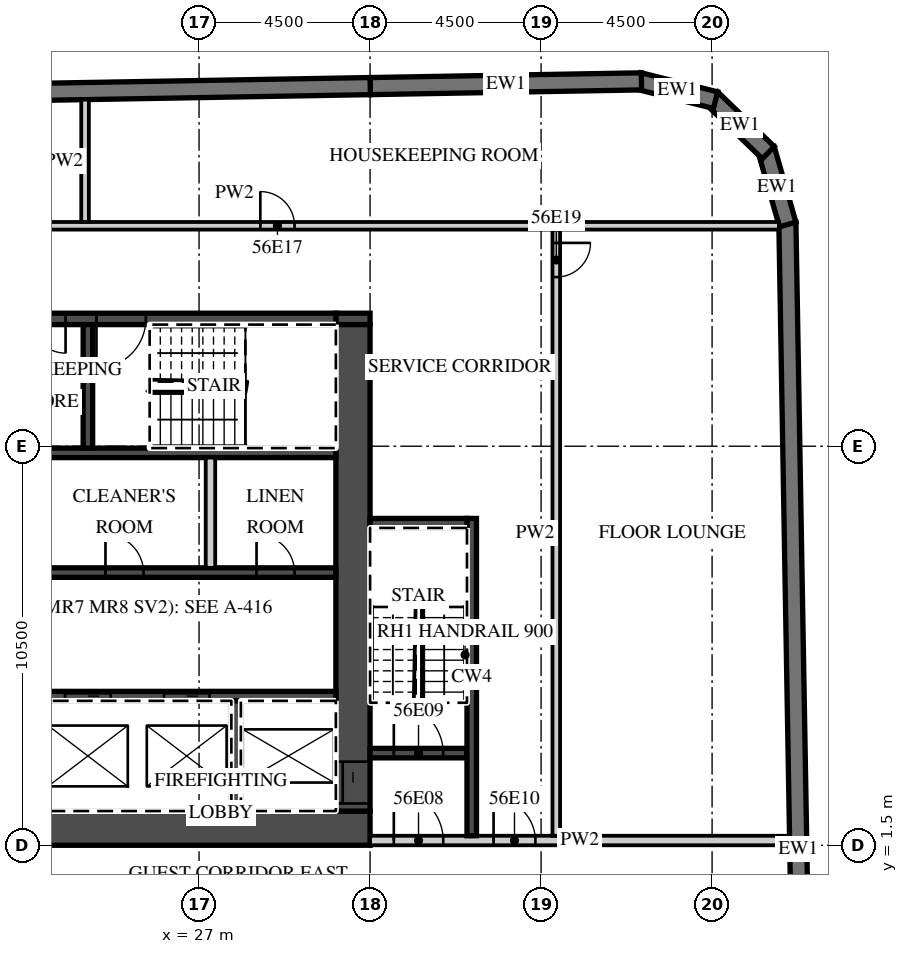
"""IFC4 building model, lengths in metres.
Left out: names, types, materials, properties, quantities, classifications, styles, units other than length and angle.
Written with IfcOpenShell. Run it as: python <this file> out.ifc"""

import sys

from ifc_helpers import new_model, si_unit, direction, frame, frame_2d, origin, place, context, subcontext, project, spatial, polyline, rectangle, outline, extrude, element, fill, save


model = new_model("IFC4")
c1 = context("Model", 3, precision=1e-05, world=origin(), true_north=direction((0.0, 1.0)))
c2 = subcontext(c1, "Body", "Model", "MODEL_VIEW")
j1 = project(units=[si_unit("LENGTHUNIT", "METRE"), si_unit("PLANEANGLEUNIT", "RADIAN")], contexts=[c1])
p1 = place(None, origin())
s1 = spatial("IfcSite", under=j1, at=p1, CompositionType="ELEMENT")
p2 = place(p1, origin())
s2 = spatial("IfcBuilding", under=s1, at=p2, CompositionType="ELEMENT")
p3 = place(p2, frame((0.0, 0.0, 230.9)))
s3 = spatial("IfcBuildingStorey", under=s2, at=p3, CompositionType="ELEMENT", Elevation=230.9)
p4 = place(p3, frame((43.057, -15.103, 0.0), z_axis=(0.0, 0.0, 1.0), x_axis=(-0.017452408953, 0.999847695112, 0.0)))
e1 = element("IfcWall", 1, at=p4, inside=s3, PredefinedType="SOLIDWALL", context=c2, shape_type="SweptSolid", body=[
    extrude(rectangle(XDim=33.0, YDim=0.45, at=frame_2d((16.5, 0.0))), origin(), (0.0, 0.0, 1.0), 3.02),
])
p5 = place(p3, frame((42.49, 17.833, 0.0), z_axis=(0.0, 0.0, 1.0), x_axis=(-0.275546368831, 0.961287781377, 0.0)))
e2 = element("IfcWall", 2, at=p5, inside=s3, PredefinedType="SOLIDWALL", context=c2, shape_type="SweptSolid", body=[
    extrude(outline(polyline([(0.0, -0.225), (2.071, -0.225), (1.95, 0.225), (0.121, 0.225), (0.0, -0.225)])), origin(), (0.0, 0.0, 1.0), 3.02),
])
p6 = place(p3, frame((41.979, 19.724, 0.0), z_axis=(0.0, 0.0, 1.0), x_axis=(-0.719379111448, 0.694617660308, 0.0)))
e3 = element("IfcWall", 3, at=p6, inside=s3, PredefinedType="SOLIDWALL", context=c2, shape_type="SweptSolid", body=[
    extrude(outline(polyline([(0.0, -0.225), (2.071, -0.225), (1.95, 0.225), (0.121, 0.225), (0.0, -0.225)])), origin(), (0.0, 0.0, 1.0), 3.02),
])
p7 = place(p3, frame((40.591, 21.106, 0.0), z_axis=(0.0, 0.0, 1.0), x_axis=(-0.970287979719, 0.241952963225, 0.0)))
e4 = element("IfcWall", 4, at=p7, inside=s3, PredefinedType="SOLIDWALL", context=c2, shape_type="SweptSolid", body=[
    extrude(outline(polyline([(0.0, -0.225), (2.071, -0.225), (1.95, 0.225), (0.121, 0.225), (0.0, -0.225)])), origin(), (0.0, 0.0, 1.0), 3.02),
])
p8 = place(p3, frame((38.641, 21.6, 0.0), z_axis=(0.0, 0.0, 1.0), x_axis=(-0.999847245074, -0.017478172627, 0.0)))
e5 = element("IfcWall", 5, at=p8, inside=s3, PredefinedType="SOLIDWALL", context=c2, shape_type="SweptSolid", body=[
    extrude(rectangle(XDim=7.138, YDim=0.45, at=frame_2d((3.569, 0.0))), origin(), (0.0, 0.0, 1.0), 3.02),
])
p9 = place(p3, frame((31.504, 21.476, 0.0), z_axis=(0.0, 0.0, 1.0), x_axis=(-0.999847677887, -0.017453395744, 0.0)))
e6 = element("IfcWall", 6, at=p9, inside=s3, PredefinedType="SOLIDWALL", context=c2, shape_type="SweptSolid", body=[
    extrude(rectangle(XDim=18.003, YDim=0.45, at=frame_2d((9.001, 0.0))), origin(), (0.0, 0.0, 1.0), 3.02),
])
p10 = place(p3, frame((13.5, 1.95, 0.0), z_axis=(0.0, 0.0, 1.0), x_axis=(1.0, 0.0, 0.0)))
e7 = element("IfcWall", 7, at=p10, inside=s3, PredefinedType="SHEAR", context=c2, shape_type="SweptSolid", body=[
    extrude(rectangle(XDim=18.0, YDim=0.9, at=frame_2d((9.0, 0.0))), origin(), (0.0, 0.0, 1.0), 3.02),
])
p11 = place(p10, frame((1.475, 0.0, 0.0)))
e8 = element("IfcOpeningElement", 8, at=p11, cuts=e7, PredefinedType="OPENING", context=c2, shape_type="SweptSolid", body=[
    extrude(rectangle(XDim=1.8, YDim=2.1, at=frame_2d((0.9, 1.05))), frame((0.0, 0.46, 0.0), z_axis=(0.0, -1.0, 0.0), x_axis=(1.0, 0.0, 0.0)), (0.0, 0.0, 1.0), 0.92),
])
p12 = place(p3, frame((30.6, 15.35, 0.0), z_axis=(0.0, 0.0, 1.0), x_axis=(1.0, 0.0, 0.0)))
e9 = element("IfcWall", 9, at=p12, inside=s3, PredefinedType="SHEAR", context=c2, shape_type="SweptSolid", body=[
    extrude(rectangle(XDim=0.9, YDim=0.3, at=frame_2d((0.45, 0.0))), origin(), (0.0, 0.0, 1.0), 3.02),
])
p13 = place(p3, frame((20.3, 15.35, 0.0), z_axis=(0.0, 0.0, 1.0), x_axis=(1.0, 0.0, 0.0)))
e10 = element("IfcWall", 10, at=p13, inside=s3, PredefinedType="SHEAR", context=c2, shape_type="SweptSolid", body=[
    extrude(rectangle(XDim=10.3, YDim=0.3, at=frame_2d((5.15, 0.0))), origin(), (0.0, 0.0, 1.0), 3.02),
])
p14 = place(p13, frame((4.0, 0.0, 0.0)))
e11 = element("IfcOpeningElement", 11, at=p14, cuts=e10, PredefinedType="OPENING", context=c2, shape_type="SweptSolid", body=[
    extrude(rectangle(XDim=1.3, YDim=2.1, at=frame_2d((0.65, 1.05))), frame((0.0, 0.16, 0.0), z_axis=(0.0, -1.0, 0.0), x_axis=(1.0, 0.0, 0.0)), (0.0, 0.0, 1.0), 0.32),
])
p15 = place(p13, frame((2.288, 0.0, 0.0)))
e12 = element("IfcOpeningElement", 12, at=p15, cuts=e10, PredefinedType="OPENING", context=c2, shape_type="SweptSolid", body=[
    extrude(rectangle(XDim=0.9, YDim=2.1, at=frame_2d((0.45, 1.05))), frame((0.0, 0.16, 0.0), z_axis=(0.0, -1.0, 0.0), x_axis=(1.0, 0.0, 0.0)), (0.0, 0.0, 1.0), 0.32),
])
p16 = place(p13, frame((0.462, 0.0, 0.0)))
e13 = element("IfcOpeningElement", 13, at=p16, cuts=e10, PredefinedType="OPENING", context=c2, shape_type="SweptSolid", body=[
    extrude(rectangle(XDim=0.9, YDim=2.1, at=frame_2d((0.45, 1.05))), frame((0.0, 0.16, 0.0), z_axis=(0.0, -1.0, 0.0), x_axis=(1.0, 0.0, 0.0)), (0.0, 0.0, 1.0), 0.32),
])
p17 = place(p3, frame((31.05, 2.4, 0.0), z_axis=(0.0, 0.0, 1.0), x_axis=(0.0, 1.0, 0.0)))
e14 = element("IfcWall", 14, at=p17, inside=s3, PredefinedType="SHEAR", context=c2, shape_type="SweptSolid", body=[
    extrude(rectangle(XDim=12.8, YDim=0.9, at=frame_2d((6.4, 0.0))), origin(), (0.0, 0.0, 1.0), 3.02),
])
p18 = place(p17, frame((0.2, 0.0, 0.0)))
e15 = element("IfcOpeningElement", 15, at=p18, cuts=e14, PredefinedType="OPENING", context=c2, shape_type="SweptSolid", body=[
    extrude(rectangle(XDim=1.1, YDim=2.1, at=frame_2d((0.55, 1.05))), frame((0.0, 0.46, 0.0), z_axis=(0.0, -1.0, 0.0), x_axis=(1.0, 0.0, 0.0)), (0.0, 0.0, 1.0), 0.92),
])
p19 = place(p3, frame((17.6, 5.425, 0.0), z_axis=(0.0, 0.0, 1.0), x_axis=(1.0, 0.0, 0.0)))
e16 = element("IfcWall", 16, at=p19, inside=s3, PredefinedType="SHEAR", context=c2, shape_type="SweptSolid", body=[
    extrude(rectangle(XDim=13.0, YDim=0.25, at=frame_2d((6.5, 0.0))), origin(), (0.0, 0.0, 1.0), 3.02),
])
p20 = place(p19, frame((8.475, 0.0, 0.0)))
e17 = element("IfcOpeningElement", 17, at=p20, cuts=e16, PredefinedType="OPENING", context=c2, shape_type="SweptSolid", body=[
    extrude(rectangle(XDim=1.2, YDim=2.1, at=frame_2d((0.6, 1.05))), frame((0.0, 0.135, 0.0), z_axis=(0.0, -1.0, 0.0), x_axis=(1.0, 0.0, 0.0)), (0.0, 0.0, 1.0), 0.27),
])
p21 = place(p19, frame((5.875, 0.0, 0.0)))
e18 = element("IfcOpeningElement", 18, at=p21, cuts=e16, PredefinedType="OPENING", context=c2, shape_type="SweptSolid", body=[
    extrude(rectangle(XDim=1.2, YDim=2.1, at=frame_2d((0.6, 1.05))), frame((0.0, 0.135, 0.0), z_axis=(0.0, -1.0, 0.0), x_axis=(1.0, 0.0, 0.0)), (0.0, 0.0, 1.0), 0.27),
])
p22 = place(p3, frame((27.975, 2.4, 0.0), z_axis=(0.0, 0.0, 1.0), x_axis=(0.0, 1.0, 0.0)))
e19 = element("IfcWall", 19, at=p22, inside=s3, PredefinedType="SHEAR", context=c2, shape_type="SweptSolid", body=[
    extrude(rectangle(XDim=2.9, YDim=0.25, at=frame_2d((1.45, 0.0))), origin(), (0.0, 0.0, 1.0), 3.02),
])
p23 = place(p3, frame((14.4, 8.675, 0.0), z_axis=(0.0, 0.0, 1.0), x_axis=(1.0, 0.0, 0.0)))
e20 = element("IfcWall", 20, at=p23, inside=s3, PredefinedType="SHEAR", context=c2, shape_type="SweptSolid", body=[
    extrude(rectangle(XDim=16.2, YDim=0.25, at=frame_2d((8.1, 0.0))), origin(), (0.0, 0.0, 1.0), 3.02),
])
p24 = place(p23, frame((6.45, 0.0, 0.0)))
e21 = element("IfcOpeningElement", 21, at=p24, cuts=e20, PredefinedType="OPENING", context=c2, shape_type="SweptSolid", body=[
    extrude(rectangle(XDim=1.2, YDim=2.1, at=frame_2d((0.6, 1.05))), frame((0.0, 0.135, 0.0), z_axis=(0.0, -1.0, 0.0), x_axis=(1.0, 0.0, 0.0)), (0.0, 0.0, 1.0), 0.27),
])
p25 = place(p23, frame((3.8, 0.0, 0.0)))
e22 = element("IfcOpeningElement", 22, at=p25, cuts=e20, PredefinedType="OPENING", context=c2, shape_type="SweptSolid", body=[
    extrude(rectangle(XDim=1.2, YDim=2.1, at=frame_2d((0.6, 1.05))), frame((0.0, 0.135, 0.0), z_axis=(0.0, -1.0, 0.0), x_axis=(1.0, 0.0, 0.0)), (0.0, 0.0, 1.0), 0.27),
])
p26 = place(p23, frame((0.65, 0.0, 0.0)))
e23 = element("IfcOpeningElement", 23, at=p26, cuts=e20, PredefinedType="OPENING", context=c2, shape_type="SweptSolid", body=[
    extrude(rectangle(XDim=1.3, YDim=2.1, at=frame_2d((0.65, 1.05))), frame((0.0, 0.135, 0.0), z_axis=(0.0, -1.0, 0.0), x_axis=(1.0, 0.0, 0.0)), (0.0, 0.0, 1.0), 0.27),
])
p27 = place(p23, frame((14.113, 0.0, 0.0)))
e24 = element("IfcOpeningElement", 24, at=p27, cuts=e20, PredefinedType="OPENING", context=c2, shape_type="SweptSolid", body=[
    extrude(rectangle(XDim=1.0, YDim=2.1, at=frame_2d((0.5, 1.05))), frame((0.0, 0.135, 0.0), z_axis=(0.0, -1.0, 0.0), x_axis=(1.0, 0.0, 0.0)), (0.0, 0.0, 1.0), 0.27),
])
p28 = place(p23, frame((10.137, 0.0, 0.0)))
e25 = element("IfcOpeningElement", 25, at=p28, cuts=e20, PredefinedType="OPENING", context=c2, shape_type="SweptSolid", body=[
    extrude(rectangle(XDim=1.0, YDim=2.1, at=frame_2d((0.5, 1.05))), frame((0.0, 0.135, 0.0), z_axis=(0.0, -1.0, 0.0), x_axis=(1.0, 0.0, 0.0)), (0.0, 0.0, 1.0), 0.27),
])
p29 = place(p3, frame((17.35, 11.825, 0.0), z_axis=(0.0, 0.0, 1.0), x_axis=(1.0, 0.0, 0.0)))
e26 = element("IfcWall", 26, at=p29, inside=s3, PredefinedType="SHEAR", context=c2, shape_type="SweptSolid", body=[
    extrude(rectangle(XDim=13.25, YDim=0.25, at=frame_2d((6.625, 0.0))), origin(), (0.0, 0.0, 1.0), 3.02),
])
p30 = place(p3, frame((27.3, 8.8, 0.0), z_axis=(0.0, 0.0, 1.0), x_axis=(0.0, 1.0, 0.0)))
e27 = element("IfcWall", 27, at=p30, inside=s3, PredefinedType="PARTITIONING", context=c2, shape_type="SweptSolid", body=[
    extrude(rectangle(XDim=2.9, YDim=0.25, at=frame_2d((1.45, 0.0))), origin(), (0.0, 0.0, 1.0), 3.02),
])
p31 = place(p3, frame((24.075, 11.95, 0.0), z_axis=(0.0, 0.0, 1.0), x_axis=(0.0, 1.0, 0.0)))
e28 = element("IfcWall", 28, at=p31, inside=s3, PredefinedType="SHEAR", context=c2, shape_type="SweptSolid", body=[
    extrude(rectangle(XDim=3.25, YDim=0.25, at=frame_2d((1.625, 0.0))), origin(), (0.0, 0.0, 1.0), 3.02),
])
p32 = place(p3, frame((31.5, 1.625, 0.0), z_axis=(0.0, 0.0, 1.0), x_axis=(1.0, 0.0, 0.0)))
e29 = element("IfcWall", 29, at=p32, inside=s3, PredefinedType="PARTITIONING", context=c2, shape_type="SweptSolid", body=[
    extrude(rectangle(XDim=11.04, YDim=0.25, at=frame_2d((5.52, 0.0))), origin(), (0.0, 0.0, 1.0), 3.02),
])
p33 = place(p32, frame((0.625, 0.0, 0.0)))
e30 = element("IfcOpeningElement", 30, at=p33, cuts=e29, PredefinedType="OPENING", context=c2, shape_type="SweptSolid", body=[
    extrude(rectangle(XDim=1.3, YDim=2.1, at=frame_2d((0.65, 1.05))), frame((0.0, 0.135, 0.0), z_axis=(0.0, -1.0, 0.0), x_axis=(1.0, 0.0, 0.0)), (0.0, 0.0, 1.0), 0.27),
])
p34 = place(p32, frame((3.25, 0.0, 0.0)))
e31 = element("IfcOpeningElement", 31, at=p34, cuts=e29, PredefinedType="OPENING", context=c2, shape_type="SweptSolid", body=[
    extrude(rectangle(XDim=1.1, YDim=2.1, at=frame_2d((0.55, 1.05))), frame((0.0, 0.135, 0.0), z_axis=(0.0, -1.0, 0.0), x_axis=(1.0, 0.0, 0.0)), (0.0, 0.0, 1.0), 0.27),
])
p35 = place(p3, frame((31.5, 3.925, 0.0), z_axis=(0.0, 0.0, 1.0), x_axis=(1.0, 0.0, 0.0)))
e32 = element("IfcWall", 32, at=p35, inside=s3, PredefinedType="SHEAR", context=c2, shape_type="SweptSolid", body=[
    extrude(rectangle(XDim=2.55, YDim=0.25, at=frame_2d((1.275, 0.0))), origin(), (0.0, 0.0, 1.0), 3.02),
])
p36 = place(p35, frame((0.625, 0.0, 0.0)))
e33 = element("IfcOpeningElement", 33, at=p36, cuts=e32, PredefinedType="OPENING", context=c2, shape_type="SweptSolid", body=[
    extrude(rectangle(XDim=1.3, YDim=2.1, at=frame_2d((0.65, 1.05))), frame((0.0, 0.135, 0.0), z_axis=(0.0, -1.0, 0.0), x_axis=(1.0, 0.0, 0.0)), (0.0, 0.0, 1.0), 0.27),
])
p37 = place(p3, frame((34.175, 1.75, 0.0), z_axis=(0.0, 0.0, 1.0), x_axis=(0.0, 1.0, 0.0)))
e34 = element("IfcWall", 34, at=p37, inside=s3, PredefinedType="SHEAR", context=c2, shape_type="SweptSolid", body=[
    extrude(rectangle(XDim=8.35, YDim=0.25, at=frame_2d((4.175, 0.0))), origin(), (0.0, 0.0, 1.0), 3.02),
])
p38 = place(p3, frame((31.5, 9.975, 0.0), z_axis=(0.0, 0.0, 1.0), x_axis=(1.0, 0.0, 0.0)))
e35 = element("IfcWall", 35, at=p38, inside=s3, PredefinedType="SHEAR", context=c2, shape_type="SweptSolid", body=[
    extrude(rectangle(XDim=2.55, YDim=0.25, at=frame_2d((1.275, 0.0))), origin(), (0.0, 0.0, 1.0), 3.02),
])
p39 = place(p3, frame((36.4, 1.75, 0.0), z_axis=(0.0, 0.0, 1.0), x_axis=(0.0, 1.0, 0.0)))
e36 = element("IfcWall", 36, at=p39, inside=s3, PredefinedType="PARTITIONING", context=c2, shape_type="SweptSolid", body=[
    extrude(rectangle(XDim=15.95, YDim=0.2, at=frame_2d((7.975, 0.0))), origin(), (0.0, 0.0, 1.0), 3.02),
])
p40 = place(p39, frame((14.7, 0.0, 0.0)))
e37 = element("IfcOpeningElement", 37, at=p40, cuts=e36, PredefinedType="OPENING", context=c2, shape_type="SweptSolid", body=[
    extrude(rectangle(XDim=0.9, YDim=2.1, at=frame_2d((0.45, 1.05))), frame((0.0, 0.11, 0.0), z_axis=(0.0, -1.0, 0.0), x_axis=(1.0, 0.0, 0.0)), (0.0, 0.0, 1.0), 0.22),
])
p41 = place(p3, frame((13.6, 17.8, 0.0), z_axis=(0.0, 0.0, 1.0), x_axis=(1.0, 0.0, 0.0)))
e38 = element("IfcWall", 38, at=p41, inside=s3, PredefinedType="PARTITIONING", context=c2, shape_type="SweptSolid", body=[
    extrude(rectangle(XDim=28.657, YDim=0.2, at=frame_2d((14.329, 0.0))), origin(), (0.0, 0.0, 1.0), 3.02),
])
p42 = place(p41, frame((15.012, 0.0, 0.0)))
e39 = element("IfcOpeningElement", 39, at=p42, cuts=e38, PredefinedType="OPENING", context=c2, shape_type="SweptSolid", body=[
    extrude(rectangle(XDim=0.9, YDim=2.1, at=frame_2d((0.45, 1.05))), frame((0.0, 0.11, 0.0), z_axis=(0.0, -1.0, 0.0), x_axis=(1.0, 0.0, 0.0)), (0.0, 0.0, 1.0), 0.22),
])
p43 = place(p41, frame((6.712, 0.0, 0.0)))
e40 = element("IfcOpeningElement", 40, at=p43, cuts=e38, PredefinedType="OPENING", context=c2, shape_type="SweptSolid", body=[
    extrude(rectangle(XDim=0.9, YDim=2.1, at=frame_2d((0.45, 1.05))), frame((0.0, 0.11, 0.0), z_axis=(0.0, -1.0, 0.0), x_axis=(1.0, 0.0, 0.0)), (0.0, 0.0, 1.0), 0.22),
])
p44 = place(p3, frame((24.0, 17.9, 0.0), z_axis=(0.0, 0.0, 1.0), x_axis=(0.0, 1.0, 0.0)))
e41 = element("IfcWall", 41, at=p44, inside=s3, PredefinedType="PARTITIONING", context=c2, shape_type="SweptSolid", body=[
    extrude(rectangle(XDim=3.22, YDim=0.2, at=frame_2d((1.61, 0.0))), origin(), (0.0, 0.0, 1.0), 3.02),
])
p45 = place(p20, origin())
e42 = element("IfcDoor", 42, at=p45, inside=s3, OperationType="SLIDING_TO_LEFT", PredefinedType="DOOR", context=c2, shape_type="SweptSolid", body=[
    extrude(rectangle(XDim=1.2, YDim=2.1, at=frame_2d((0.6, 1.05))), frame((0.0, 0.025, 0.0), z_axis=(0.0, -1.0, 0.0), x_axis=(1.0, 0.0, 0.0)), (0.0, 0.0, 1.0), 0.05),
])
fill(e17, e42)
p46 = place(p21, origin())
e43 = element("IfcDoor", 43, at=p46, inside=s3, OperationType="SLIDING_TO_RIGHT", PredefinedType="DOOR", context=c2, shape_type="SweptSolid", body=[
    extrude(rectangle(XDim=1.2, YDim=2.1, at=frame_2d((0.6, 1.05))), frame((0.0, 0.025, 0.0), z_axis=(0.0, -1.0, 0.0), x_axis=(1.0, 0.0, 0.0)), (0.0, 0.0, 1.0), 0.05),
])
fill(e18, e43)
p47 = place(p18, origin())
e44 = element("IfcDoor", 44, at=p47, inside=s3, OperationType="SLIDING_TO_LEFT", PredefinedType="DOOR", context=c2, shape_type="SweptSolid", body=[
    extrude(rectangle(XDim=1.1, YDim=2.1, at=frame_2d((0.55, 1.05))), frame((0.0, 0.025, 0.0), z_axis=(0.0, -1.0, 0.0), x_axis=(1.0, 0.0, 0.0)), (0.0, 0.0, 1.0), 0.05),
])
fill(e15, e44)
p48 = place(p33, origin())
e45 = element("IfcDoor", 45, at=p48, inside=s3, OperationType="SINGLE_SWING_LEFT", PredefinedType="DOOR", context=c2, shape_type="SweptSolid", body=[
    extrude(rectangle(XDim=1.3, YDim=2.1, at=frame_2d((0.65, 1.05))), frame((0.0, 0.025, 0.0), z_axis=(0.0, -1.0, 0.0), x_axis=(1.0, 0.0, 0.0)), (0.0, 0.0, 1.0), 0.05),
])
fill(e30, e45)
p49 = place(p36, origin())
e46 = element("IfcDoor", 46, at=p49, inside=s3, OperationType="SINGLE_SWING_LEFT", PredefinedType="DOOR", context=c2, shape_type="SweptSolid", body=[
    extrude(rectangle(XDim=1.3, YDim=2.1, at=frame_2d((0.65, 1.05))), frame((0.0, 0.025, 0.0), z_axis=(0.0, -1.0, 0.0), x_axis=(1.0, 0.0, 0.0)), (0.0, 0.0, 1.0), 0.05),
])
fill(e33, e46)
p50 = place(p34, origin())
e47 = element("IfcDoor", 47, at=p50, inside=s3, OperationType="SINGLE_SWING_LEFT", PredefinedType="DOOR", context=c2, shape_type="SweptSolid", body=[
    extrude(rectangle(XDim=1.1, YDim=2.1, at=frame_2d((0.55, 1.05))), frame((0.0, 0.025, 0.0), z_axis=(0.0, -1.0, 0.0), x_axis=(1.0, 0.0, 0.0)), (0.0, 0.0, 1.0), 0.05),
])
fill(e31, e47)
p51 = place(p14, origin())
e48 = element("IfcDoor", 48, at=p51, inside=s3, OperationType="SINGLE_SWING_LEFT", PredefinedType="DOOR", context=c2, shape_type="SweptSolid", body=[
    extrude(rectangle(XDim=1.3, YDim=2.1, at=frame_2d((0.65, 1.05))), frame((0.0, 0.025, 0.0), z_axis=(0.0, -1.0, 0.0), x_axis=(1.0, 0.0, 0.0)), (0.0, 0.0, 1.0), 0.05),
])
fill(e11, e48)
p52 = place(p15, origin())
e49 = element("IfcDoor", 49, at=p52, inside=s3, OperationType="SINGLE_SWING_RIGHT", PredefinedType="DOOR", context=c2, shape_type="SweptSolid", body=[
    extrude(rectangle(XDim=0.9, YDim=2.1, at=frame_2d((0.45, 1.05))), frame((0.0, 0.025, 0.0), z_axis=(0.0, -1.0, 0.0), x_axis=(1.0, 0.0, 0.0)), (0.0, 0.0, 1.0), 0.05),
])
fill(e12, e49)
p53 = place(p27, origin())
e50 = element("IfcDoor", 50, at=p53, inside=s3, OperationType="SINGLE_SWING_LEFT", PredefinedType="DOOR", context=c2, shape_type="SweptSolid", body=[
    extrude(rectangle(XDim=1.0, YDim=2.1, at=frame_2d((0.5, 1.05))), frame((0.0, 0.025, 0.0), z_axis=(0.0, -1.0, 0.0), x_axis=(1.0, 0.0, 0.0)), (0.0, 0.0, 1.0), 0.05),
])
fill(e24, e50)
p54 = place(p28, origin())
e51 = element("IfcDoor", 51, at=p54, inside=s3, OperationType="SINGLE_SWING_LEFT", PredefinedType="DOOR", context=c2, shape_type="SweptSolid", body=[
    extrude(rectangle(XDim=1.0, YDim=2.1, at=frame_2d((0.5, 1.05))), frame((0.0, 0.025, 0.0), z_axis=(0.0, -1.0, 0.0), x_axis=(1.0, 0.0, 0.0)), (0.0, 0.0, 1.0), 0.05),
])
fill(e25, e51)
p55 = place(p42, origin())
e52 = element("IfcDoor", 52, at=p55, inside=s3, OperationType="SINGLE_SWING_LEFT", PredefinedType="DOOR", context=c2, shape_type="SweptSolid", body=[
    extrude(rectangle(XDim=0.9, YDim=2.1, at=frame_2d((0.45, 1.05))), frame((0.0, 0.025, 0.0), z_axis=(0.0, -1.0, 0.0), x_axis=(1.0, 0.0, 0.0)), (0.0, 0.0, 1.0), 0.05),
])
fill(e39, e52)
p56 = place(p40, origin())
e53 = element("IfcDoor", 53, at=p56, inside=s3, OperationType="SINGLE_SWING_RIGHT", PredefinedType="DOOR", context=c2, shape_type="SweptSolid", body=[
    extrude(rectangle(XDim=0.9, YDim=2.1, at=frame_2d((0.45, 1.05))), frame((0.0, 0.025, 0.0), z_axis=(0.0, -1.0, 0.0), x_axis=(1.0, 0.0, 0.0)), (0.0, 0.0, 1.0), 0.05),
])
fill(e37, e53)
save(model, sys.argv[1])
